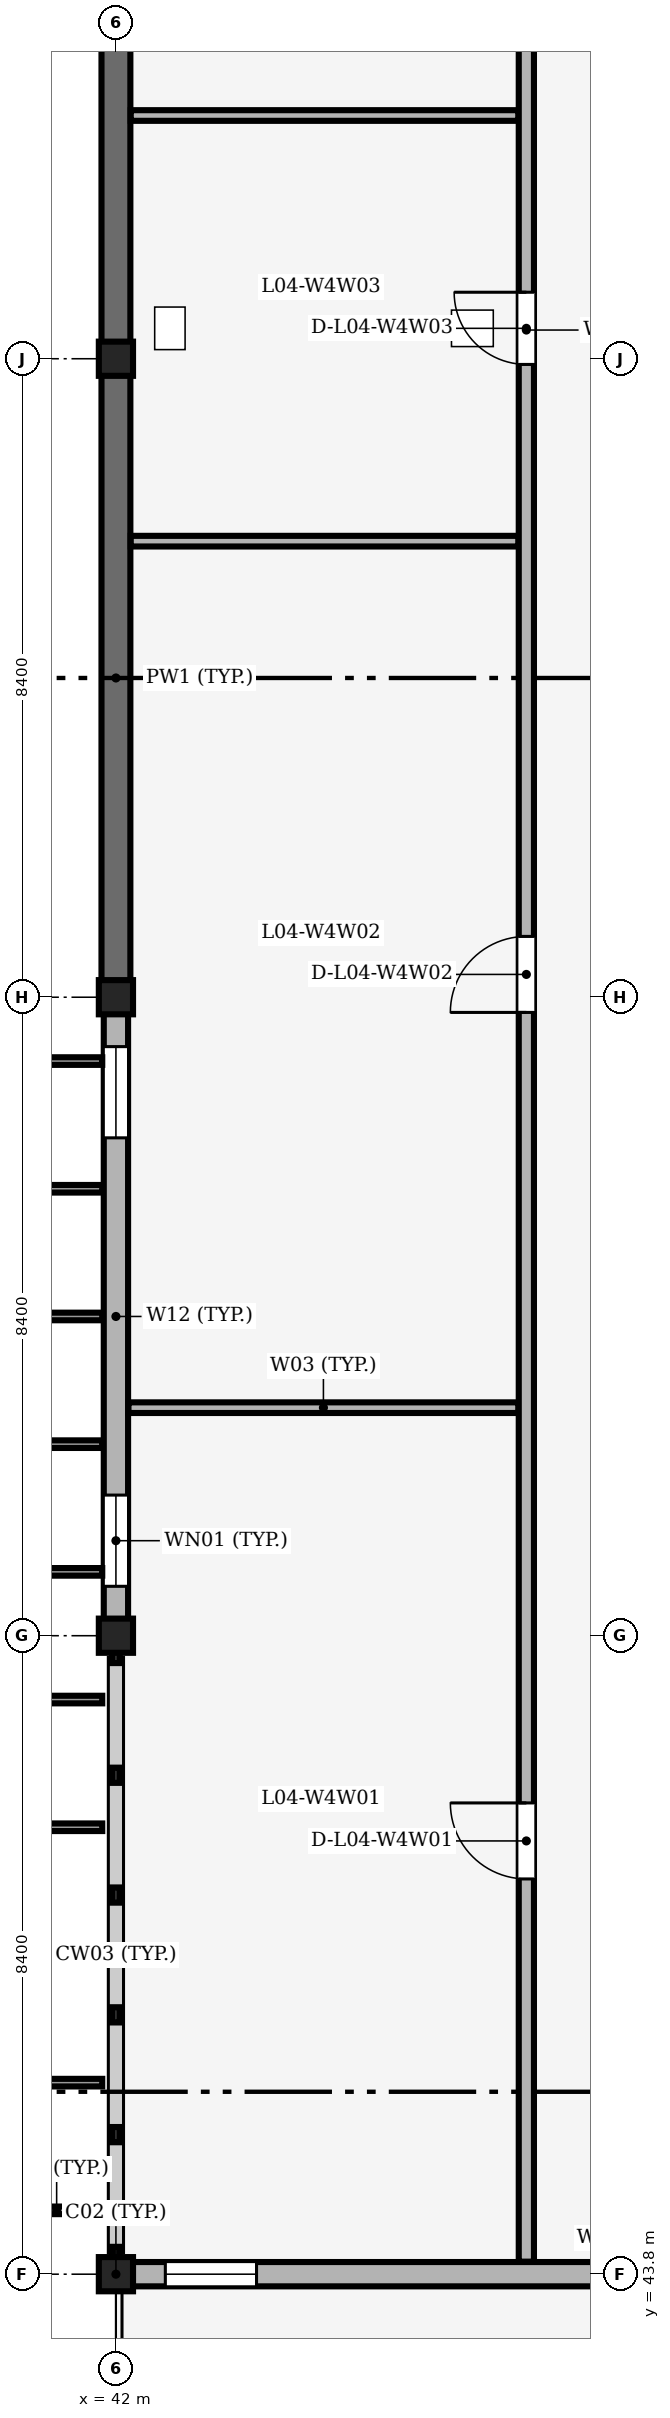
"""IFC4 building model, lengths in metres.
Left out: names, types, materials, properties, quantities, classifications, styles, units other than length and angle.
Written with IfcOpenShell. Run it as: python <this file> out.ifc"""

import sys

from ifc_helpers import new_model, si_unit, direction, frame, frame_2d, origin, origin_2d, place, context, subcontext, project, spatial, rectangle, extrude, element, fill, save


model = new_model("IFC4")
c1 = context("Model", 3, precision=1e-05, world=origin(), true_north=direction((0.0, 1.0)))
c2 = subcontext(c1, "Body", "Model", "MODEL_VIEW")
j1 = project(units=[si_unit("LENGTHUNIT", "METRE"), si_unit("PLANEANGLEUNIT", "RADIAN")], contexts=[c1])
p1 = place(None, origin())
s1 = spatial("IfcSite", under=j1, at=p1, CompositionType="ELEMENT")
p2 = place(p1, origin())
s2 = spatial("IfcBuilding", under=s1, at=p2, CompositionType="ELEMENT")
p3 = place(p2, frame((0.0, 0.0, 17.4)))
s3 = spatial("IfcBuildingStorey", under=s2, at=p3, CompositionType="ELEMENT", Elevation=17.4)
for number, where, z_axis, x_axis in (
    (1, (42.0, 43.8, 0.0), (0.0, 0.0, 1.0), (1.0, 0.0, 0.0)),
    (2, (42.0, 52.2, 0.0), (0.0, 0.0, 1.0), (1.0, 0.0, 0.0)),
    (3, (42.0, 60.6, 0.0), (0.0, 0.0, 1.0), (1.0, 0.0, 0.0)),
    (4, (42.0, 69.0, 0.0), (0.0, 0.0, 1.0), (1.0, 0.0, 0.0)),
):
    element("IfcColumn", number, at=place(p3, frame(where, z_axis=z_axis, x_axis=x_axis)), inside=s3, PredefinedType="COLUMN", context=c2, shape_type="SweptSolid", body=[
        extrude(rectangle(XDim=0.45, YDim=0.45, at=origin_2d()), origin(), (0.0, 0.0, 1.0), 4.2),
    ])
p4 = place(p3, frame((42.0, 52.4, 0.0), z_axis=(0.0, 0.0, 1.0), x_axis=(0.0, 1.0, 0.0)))
e5 = element("IfcWall", 5, at=p4, inside=s3, PredefinedType="SOLIDWALL", context=c2, shape_type="SweptSolid", body=[
    extrude(rectangle(XDim=8.0, YDim=0.32, at=frame_2d((4.0, 0.0))), origin(), (0.0, 0.0, 1.0), 3.34),
])
p5 = place(p4, frame((0.45, 0.0, 0.85)))
e6 = element("IfcOpeningElement", 6, at=p5, cuts=e5, PredefinedType="OPENING", context=c2, shape_type="SweptSolid", body=[
    extrude(rectangle(XDim=1.2, YDim=1.5, at=frame_2d((0.6, 0.75))), frame((0.0, 0.17, 0.0), z_axis=(0.0, -1.0, 0.0), x_axis=(1.0, 0.0, 0.0)), (0.0, 0.0, 1.0), 0.34),
])
p6 = place(p4, frame((6.35, 0.0, 0.85)))
e7 = element("IfcOpeningElement", 7, at=p6, cuts=e5, PredefinedType="OPENING", context=c2, shape_type="SweptSolid", body=[
    extrude(rectangle(XDim=1.2, YDim=1.5, at=frame_2d((0.6, 0.75))), frame((0.0, 0.17, 0.0), z_axis=(0.0, -1.0, 0.0), x_axis=(1.0, 0.0, 0.0)), (0.0, 0.0, 1.0), 0.34),
])
p7 = place(p3, frame((42.0, 60.8, 0.0), z_axis=(0.0, 0.0, 1.0), x_axis=(0.0, 1.0, 0.0)))
e8 = element("IfcWall", 8, at=p7, inside=s3, PredefinedType="SHEAR", context=c2, shape_type="SweptSolid", body=[
    extrude(rectangle(XDim=8.0, YDim=0.38, at=frame_2d((4.0, 0.0))), origin(), (0.0, 0.0, 1.0), 3.29),
])
p8 = place(p3, frame((42.0, 69.2, 0.0), z_axis=(0.0, 0.0, 1.0), x_axis=(0.0, 1.0, 0.0)))
e9 = element("IfcWall", 9, at=p8, inside=s3, PredefinedType="SHEAR", context=c2, shape_type="SweptSolid", body=[
    extrude(rectangle(XDim=8.0, YDim=0.38, at=frame_2d((4.0, 0.0))), origin(), (0.0, 0.0, 1.0), 3.24),
])
p9 = place(p3, frame((42.2, 43.8, 0.0), z_axis=(0.0, 0.0, 1.0), x_axis=(1.0, 0.0, 0.0)))
e10 = element("IfcWall", 10, at=p9, inside=s3, PredefinedType="SOLIDWALL", context=c2, shape_type="SweptSolid", body=[
    extrude(rectangle(XDim=8.0, YDim=0.32, at=frame_2d((4.0, 0.0))), origin(), (0.0, 0.0, 1.0), 3.29),
])
p10 = place(p9, frame((0.45, 0.0, 0.9)))
e11 = element("IfcOpeningElement", 11, at=p10, cuts=e10, PredefinedType="OPENING", context=c2, shape_type="SweptSolid", body=[
    extrude(rectangle(XDim=1.2, YDim=1.5, at=frame_2d((0.6, 0.75))), frame((0.0, 0.17, 0.0), z_axis=(0.0, -1.0, 0.0), x_axis=(1.0, 0.0, 0.0)), (0.0, 0.0, 1.0), 0.34),
])
p11 = place(p9, frame((6.35, 0.0, 0.9)))
e12 = element("IfcOpeningElement", 12, at=p11, cuts=e10, PredefinedType="OPENING", context=c2, shape_type="SweptSolid", body=[
    extrude(rectangle(XDim=1.2, YDim=1.8, at=frame_2d((0.6, 0.9))), frame((0.0, 0.17, 0.0), z_axis=(0.0, -1.0, 0.0), x_axis=(1.0, 0.0, 0.0)), (0.0, 0.0, 1.0), 0.34),
])
p12 = place(p3, frame((42.165, 55.2, 0.0), z_axis=(0.0, 0.0, 1.0), x_axis=(1.0, 0.0, 0.0)))
e13 = element("IfcWall", 13, at=p12, inside=s3, PredefinedType="PARTITIONING", context=c2, shape_type="SweptSolid", body=[
    extrude(rectangle(XDim=5.13, YDim=0.14, at=frame_2d((2.565, 0.0))), origin(), (0.0, 0.0, 1.0), 3.49),
])
p13 = place(p3, frame((42.195, 66.6, 0.0), z_axis=(0.0, 0.0, 1.0), x_axis=(1.0, 0.0, 0.0)))
e14 = element("IfcWall", 14, at=p13, inside=s3, PredefinedType="PARTITIONING", context=c2, shape_type="SweptSolid", body=[
    extrude(rectangle(XDim=5.1, YDim=0.14, at=frame_2d((2.55, 0.0))), origin(), (0.0, 0.0, 1.0), 3.49),
])
p14 = place(p3, frame((42.195, 72.2, 0.0), z_axis=(0.0, 0.0, 1.0), x_axis=(1.0, 0.0, 0.0)))
e15 = element("IfcWall", 15, at=p14, inside=s3, PredefinedType="PARTITIONING", context=c2, shape_type="SweptSolid", body=[
    extrude(rectangle(XDim=5.1, YDim=0.14, at=frame_2d((2.55, 0.0))), origin(), (0.0, 0.0, 1.0), 3.9),
])
p15 = place(p3, frame((47.4, 43.965, 0.0), z_axis=(0.0, 0.0, 1.0), x_axis=(0.0, 1.0, 0.0)))
e16 = element("IfcWall", 16, at=p15, inside=s3, PredefinedType="PARTITIONING", context=c2, shape_type="SweptSolid", body=[
    extrude(rectangle(XDim=50.825, YDim=0.2, at=frame_2d((25.413, 0.0))), origin(), (0.0, 0.0, 1.0), 3.9),
])
p16 = place(p15, frame((5.035, 0.0, 0.0)))
e17 = element("IfcOpeningElement", 17, at=p16, cuts=e16, PredefinedType="OPENING", context=c2, shape_type="SweptSolid", body=[
    extrude(rectangle(XDim=1.0, YDim=2.15, at=frame_2d((0.5, 1.075))), frame((0.0, 0.11, 0.0), z_axis=(0.0, -1.0, 0.0), x_axis=(1.0, 0.0, 0.0)), (0.0, 0.0, 1.0), 0.22),
])
p17 = place(p15, frame((16.435, 0.0, 0.0)))
e18 = element("IfcOpeningElement", 18, at=p17, cuts=e16, PredefinedType="OPENING", context=c2, shape_type="SweptSolid", body=[
    extrude(rectangle(XDim=1.0, YDim=2.15, at=frame_2d((0.5, 1.075))), frame((0.0, 0.11, 0.0), z_axis=(0.0, -1.0, 0.0), x_axis=(1.0, 0.0, 0.0)), (0.0, 0.0, 1.0), 0.22),
])
p18 = place(p15, frame((24.96, 0.0, 0.0)))
e19 = element("IfcOpeningElement", 19, at=p18, cuts=e16, PredefinedType="OPENING", context=c2, shape_type="SweptSolid", body=[
    extrude(rectangle(XDim=0.95, YDim=2.2, at=frame_2d((0.475, 1.1))), frame((0.0, 0.11, 0.0), z_axis=(0.0, -1.0, 0.0), x_axis=(1.0, 0.0, 0.0)), (0.0, 0.0, 1.0), 0.22),
])
p19 = place(p15, frame((30.56, 0.0, 0.0)))
e20 = element("IfcOpeningElement", 20, at=p19, cuts=e16, PredefinedType="OPENING", context=c2, shape_type="SweptSolid", body=[
    extrude(rectangle(XDim=0.95, YDim=2.2, at=frame_2d((0.475, 1.1))), frame((0.0, 0.11, 0.0), z_axis=(0.0, -1.0, 0.0), x_axis=(1.0, 0.0, 0.0)), (0.0, 0.0, 1.0), 0.22),
])
p20 = place(p15, frame((36.16, 0.0, 0.0)))
e21 = element("IfcOpeningElement", 21, at=p20, cuts=e16, PredefinedType="OPENING", context=c2, shape_type="SweptSolid", body=[
    extrude(rectangle(XDim=0.95, YDim=2.1, at=frame_2d((0.475, 1.05))), frame((0.0, 0.11, 0.0), z_axis=(0.0, -1.0, 0.0), x_axis=(1.0, 0.0, 0.0)), (0.0, 0.0, 1.0), 0.22),
])
p21 = place(p15, frame((44.635, 0.0, 0.0)))
e22 = element("IfcOpeningElement", 22, at=p21, cuts=e16, PredefinedType="OPENING", context=c2, shape_type="SweptSolid", body=[
    extrude(rectangle(XDim=1.0, YDim=2.15, at=frame_2d((0.5, 1.075))), frame((0.0, 0.11, 0.0), z_axis=(0.0, -1.0, 0.0), x_axis=(1.0, 0.0, 0.0)), (0.0, 0.0, 1.0), 0.22),
])
p22 = place(p5, origin())
e23 = element("IfcWindow", 23, at=p22, inside=s3, PartitioningType="SINGLE_PANEL", PredefinedType="WINDOW", context=c2, shape_type="SweptSolid", body=[
    extrude(rectangle(XDim=1.2, YDim=1.5, at=frame_2d((0.6, 0.75))), frame((0.0, 0.03, 0.0), z_axis=(0.0, -1.0, 0.0), x_axis=(1.0, 0.0, 0.0)), (0.0, 0.0, 1.0), 0.06),
])
fill(e6, e23)
p23 = place(p6, origin())
e24 = element("IfcWindow", 24, at=p23, inside=s3, PartitioningType="SINGLE_PANEL", PredefinedType="WINDOW", context=c2, shape_type="SweptSolid", body=[
    extrude(rectangle(XDim=1.2, YDim=1.5, at=frame_2d((0.6, 0.75))), frame((0.0, 0.03, 0.0), z_axis=(0.0, -1.0, 0.0), x_axis=(1.0, 0.0, 0.0)), (0.0, 0.0, 1.0), 0.06),
])
fill(e7, e24)
p24 = place(p10, origin())
e25 = element("IfcWindow", 25, at=p24, inside=s3, PartitioningType="SINGLE_PANEL", PredefinedType="WINDOW", context=c2, shape_type="SweptSolid", body=[
    extrude(rectangle(XDim=1.2, YDim=1.5, at=frame_2d((0.6, 0.75))), frame((0.0, 0.03, 0.0), z_axis=(0.0, -1.0, 0.0), x_axis=(1.0, 0.0, 0.0)), (0.0, 0.0, 1.0), 0.06),
])
fill(e11, e25)
p25 = place(p16, origin())
e26 = element("IfcDoor", 26, at=p25, inside=s3, OperationType="SINGLE_SWING_RIGHT", PredefinedType="DOOR", context=c2, shape_type="SweptSolid", body=[
    extrude(rectangle(XDim=1.0, YDim=2.15, at=frame_2d((0.5, 1.075))), frame((0.0, 0.025, 0.0), z_axis=(0.0, -1.0, 0.0), x_axis=(1.0, 0.0, 0.0)), (0.0, 0.0, 1.0), 0.05),
])
fill(e17, e26)
p26 = place(p17, origin())
e27 = element("IfcDoor", 27, at=p26, inside=s3, OperationType="SINGLE_SWING_LEFT", PredefinedType="DOOR", context=c2, shape_type="SweptSolid", body=[
    extrude(rectangle(XDim=1.0, YDim=2.15, at=frame_2d((0.5, 1.075))), frame((0.0, 0.025, 0.0), z_axis=(0.0, -1.0, 0.0), x_axis=(1.0, 0.0, 0.0)), (0.0, 0.0, 1.0), 0.05),
])
fill(e18, e27)
p27 = place(p18, origin())
e28 = element("IfcDoor", 28, at=p27, inside=s3, OperationType="SINGLE_SWING_RIGHT", PredefinedType="DOOR", context=c2, shape_type="SweptSolid", body=[
    extrude(rectangle(XDim=0.95, YDim=2.2, at=frame_2d((0.475, 1.1))), frame((0.0, 0.025, 0.0), z_axis=(0.0, -1.0, 0.0), x_axis=(1.0, 0.0, 0.0)), (0.0, 0.0, 1.0), 0.05),
])
fill(e19, e28)
save(model, sys.argv[1])
